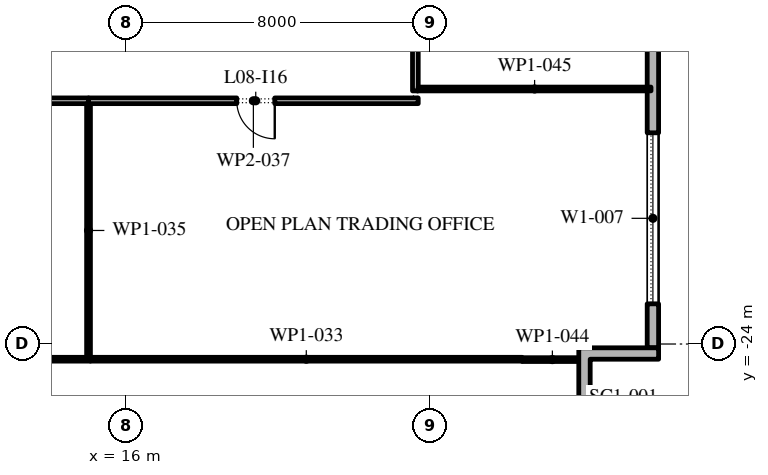
"""IFC4 building model, lengths in metres.
Left out: names, types, materials, properties, quantities, classifications, styles, units other than length and angle.
Written with IfcOpenShell. Run it as: python <this file> out.ifc"""

import sys

from ifc_helpers import new_model, si_unit, direction, frame, frame_2d, origin, place, context, subcontext, project, spatial, polyline, rectangle, outline, extrude, element, fill, save


model = new_model("IFC4")
c1 = context("Model", 3, precision=1e-05, world=origin(), true_north=direction((0.0, 1.0)))
c2 = subcontext(c1, "Body", "Model", "MODEL_VIEW")
j1 = project(units=[si_unit("LENGTHUNIT", "METRE"), si_unit("PLANEANGLEUNIT", "RADIAN")], contexts=[c1])
p1 = place(None, origin())
s1 = spatial("IfcSite", under=j1, at=p1, CompositionType="ELEMENT")
p2 = place(p1, origin())
s2 = spatial("IfcBuilding", under=s1, at=p2, CompositionType="ELEMENT")
p3 = place(p2, frame((0.0, 0.0, 43.8)))
s3 = spatial("IfcBuildingStorey", under=s2, at=p3, CompositionType="ELEMENT", Elevation=43.8)
p4 = place(p3, frame((29.85, -24.1, 0.0), z_axis=(0.0, 0.0, 1.0), x_axis=(0.0, 1.0, 0.0)))
e1 = element("IfcWall", 1, at=p4, inside=s3, PredefinedType="STANDARD", context=c2, shape_type="SweptSolid", body=[
    extrude(rectangle(XDim=49.5, YDim=0.3, at=frame_2d((24.75, 0.0))), origin(), (0.0, 0.0, 1.0), 4.0),
])
p5 = place(p4, frame((1.157, 0.0, 0.45)))
e2 = element("IfcOpeningElement", 2, at=p5, cuts=e1, PredefinedType="OPENING", context=c2, shape_type="SweptSolid", body=[
    extrude(rectangle(XDim=4.5, YDim=3.05, at=frame_2d((2.25, 1.525))), frame((0.0, 0.16, 0.0), z_axis=(0.0, -1.0, 0.0), x_axis=(1.0, 0.0, 0.0)), (0.0, 0.0, 1.0), 0.32),
])
p6 = place(p4, frame((8.121, 0.0, 0.45)))
e3 = element("IfcOpeningElement", 3, at=p6, cuts=e1, PredefinedType="OPENING", context=c2, shape_type="SweptSolid", body=[
    extrude(rectangle(XDim=4.5, YDim=2.825, at=frame_2d((2.25, 1.413))), frame((0.0, 0.16, 0.0), z_axis=(0.0, -1.0, 0.0), x_axis=(1.0, 0.0, 0.0)), (0.0, 0.0, 1.0), 0.32),
])
p7 = place(p4, frame((16.286, 0.0, 0.0)))
e4 = element("IfcOpeningElement", 4, at=p7, cuts=e1, PredefinedType="OPENING", context=c2, shape_type="SweptSolid", body=[
    extrude(rectangle(XDim=2.4, YDim=3.325, at=frame_2d((1.2, 1.663))), frame((0.0, 0.16, 0.0), z_axis=(0.0, -1.0, 0.0), x_axis=(1.0, 0.0, 0.0)), (0.0, 0.0, 1.0), 0.32),
])
p8 = place(p4, frame((22.35, 0.0, 0.45)))
e5 = element("IfcOpeningElement", 5, at=p8, cuts=e1, PredefinedType="OPENING", context=c2, shape_type="SweptSolid", body=[
    extrude(rectangle(XDim=4.5, YDim=2.875, at=frame_2d((2.25, 1.438))), frame((0.0, 0.16, 0.0), z_axis=(0.0, -1.0, 0.0), x_axis=(1.0, 0.0, 0.0)), (0.0, 0.0, 1.0), 0.32),
])
p9 = place(p4, frame((29.464, 0.0, 0.45)))
e6 = element("IfcOpeningElement", 6, at=p9, cuts=e1, PredefinedType="OPENING", context=c2, shape_type="SweptSolid", body=[
    extrude(rectangle(XDim=4.5, YDim=2.875, at=frame_2d((2.25, 1.438))), frame((0.0, 0.16, 0.0), z_axis=(0.0, -1.0, 0.0), x_axis=(1.0, 0.0, 0.0)), (0.0, 0.0, 1.0), 0.32),
])
p10 = place(p4, frame((36.579, 0.0, 0.45)))
e7 = element("IfcOpeningElement", 7, at=p10, cuts=e1, PredefinedType="OPENING", context=c2, shape_type="SweptSolid", body=[
    extrude(rectangle(XDim=4.5, YDim=3.05, at=frame_2d((2.25, 1.525))), frame((0.0, 0.16, 0.0), z_axis=(0.0, -1.0, 0.0), x_axis=(1.0, 0.0, 0.0)), (0.0, 0.0, 1.0), 0.32),
])
p11 = place(p4, frame((44.743, 0.0, 0.0)))
e8 = element("IfcOpeningElement", 8, at=p11, cuts=e1, PredefinedType="OPENING", context=c2, shape_type="SweptSolid", body=[
    extrude(rectangle(XDim=2.4, YDim=3.325, at=frame_2d((1.2, 1.663))), frame((0.0, 0.16, 0.0), z_axis=(0.0, -1.0, 0.0), x_axis=(1.0, 0.0, 0.0)), (0.0, 0.0, 1.0), 0.32),
])
p12 = place(p3, origin())
e9 = element("IfcWall", 9, at=p12, inside=s3, PredefinedType="STANDARD", context=c2, shape_type="SweptSolid", body=[
    extrude(outline(polyline([(27.9, -25.9), (27.9, -24.1), (30.0, -24.1), (30.0, -24.4), (28.2, -24.4), (28.2, -26.2), (26.4, -26.2), (26.4, -27.7), (26.1, -27.7), (26.1, -25.9), (27.9, -25.9)])), origin(), (0.0, 0.0, 1.0), 4.0),
])
p13 = place(p3, frame((1.45, -24.4, 0.0), z_axis=(0.0, 0.0, 1.0), x_axis=(1.0, 0.0, 0.0)))
e10 = element("IfcWall", 10, at=p13, inside=s3, PredefinedType="PARTITIONING", context=c2, shape_type="SweptSolid", body=[
    extrude(rectangle(XDim=13.6, YDim=0.1, at=frame_2d((6.8, 0.0))), origin(), (0.0, 0.0, 1.0), 4.0),
])
p14 = place(p3, frame((15.05, -24.4, 0.0), z_axis=(0.0, 0.0, 1.0), x_axis=(1.0, 0.0, 0.0)))
e11 = element("IfcWall", 11, at=p14, inside=s3, PredefinedType="PARTITIONING", context=c2, shape_type="SweptSolid", body=[
    extrude(rectangle(XDim=11.36, YDim=0.1, at=frame_2d((5.68, 0.0))), origin(), (0.0, 0.0, 1.0), 4.0),
])
p15 = place(p3, frame((15.0, -17.6, 0.0), z_axis=(0.0, 0.0, 1.0), x_axis=(-1.0, 0.0, 0.0)))
e12 = element("IfcWall", 12, at=p15, inside=s3, PredefinedType="PARTITIONING", context=c2, shape_type="SweptSolid", body=[
    extrude(rectangle(XDim=6.525, YDim=0.15, at=frame_2d((3.262, 0.0))), origin(), (0.0, 0.0, 1.0), 4.0),
])
p16 = place(p15, frame((2.7, 0.0, 0.0)))
e13 = element("IfcOpeningElement", 13, at=p16, cuts=e12, PredefinedType="OPENING", context=c2, shape_type="SweptSolid", body=[
    extrude(rectangle(XDim=1.0, YDim=2.1, at=frame_2d((0.5, 1.05))), frame((0.0, 0.085, 0.0), z_axis=(0.0, -1.0, 0.0), x_axis=(1.0, 0.0, 0.0)), (0.0, 0.0, 1.0), 0.17),
])
p17 = place(p3, frame((15.0, -17.675, 0.0), z_axis=(0.0, 0.0, 1.0), x_axis=(0.0, -1.0, 0.0)))
e14 = element("IfcWall", 14, at=p17, inside=s3, PredefinedType="PARTITIONING", context=c2, shape_type="SweptSolid", body=[
    extrude(rectangle(XDim=6.675, YDim=0.1, at=frame_2d((3.337, 0.0))), origin(), (0.0, 0.0, 1.0), 4.0),
])
p18 = place(p3, frame((23.675, -17.6, 0.0), z_axis=(0.0, 0.0, 1.0), x_axis=(-1.0, 0.0, 0.0)))
e15 = element("IfcWall", 15, at=p18, inside=s3, PredefinedType="PARTITIONING", context=c2, shape_type="SweptSolid", body=[
    extrude(rectangle(XDim=8.675, YDim=0.15, at=frame_2d((4.337, 0.0))), origin(), (0.0, 0.0, 1.0), 4.0),
])
p19 = place(p18, frame((3.775, 0.0, 0.0)))
e16 = element("IfcOpeningElement", 16, at=p19, cuts=e15, PredefinedType="OPENING", context=c2, shape_type="SweptSolid", body=[
    extrude(rectangle(XDim=1.0, YDim=2.1, at=frame_2d((0.5, 1.05))), frame((0.0, 0.085, 0.0), z_axis=(0.0, -1.0, 0.0), x_axis=(1.0, 0.0, 0.0)), (0.0, 0.0, 1.0), 0.17),
])
p20 = place(p3, frame((23.6, -10.22, 0.0), z_axis=(0.0, 0.0, 1.0), x_axis=(0.0, -1.0, 0.0)))
e17 = element("IfcWall", 17, at=p20, inside=s3, PredefinedType="PARTITIONING", context=c2, shape_type="SweptSolid", body=[
    extrude(rectangle(XDim=7.12, YDim=0.15, at=frame_2d((3.56, 0.0))), origin(), (0.0, 0.0, 1.0), 4.0),
])
p21 = place(p20, frame((2.42, 0.0, 0.0)))
e18 = element("IfcOpeningElement", 18, at=p21, cuts=e17, PredefinedType="OPENING", context=c2, shape_type="SweptSolid", body=[
    extrude(rectangle(XDim=1.0, YDim=2.1, at=frame_2d((0.5, 1.05))), frame((0.0, 0.085, 0.0), z_axis=(0.0, -1.0, 0.0), x_axis=(1.0, 0.0, 0.0)), (0.0, 0.0, 1.0), 0.17),
])
p22 = place(p3, frame((26.41, -24.41, 0.0), z_axis=(0.0, 0.0, 1.0), x_axis=(1.0, 0.0, 0.0)))
e19 = element("IfcWall", 19, at=p22, inside=s3, PredefinedType="PARTITIONING", context=c2, shape_type="SweptSolid", body=[
    extrude(rectangle(XDim=1.59, YDim=0.1, at=frame_2d((0.795, 0.0))), origin(), (0.0, 0.0, 1.0), 4.0),
])
p23 = place(p3, frame((29.8, -17.29, 0.0), z_axis=(0.0, 0.0, 1.0), x_axis=(-1.0, 0.0, 0.0)))
e20 = element("IfcWall", 20, at=p23, inside=s3, PredefinedType="PARTITIONING", context=c2, shape_type="SweptSolid", body=[
    extrude(rectangle(XDim=6.125, YDim=0.1, at=frame_2d((3.062, 0.0))), origin(), (0.0, 0.0, 1.0), 4.0),
])
p24 = place(p5, origin())
e21 = element("IfcWindow", 21, at=p24, inside=s3, PartitioningType="DOUBLE_PANEL_VERTICAL", PredefinedType="WINDOW", context=c2, shape_type="SweptSolid", body=[
    extrude(rectangle(XDim=4.5, YDim=3.05, at=frame_2d((2.25, 1.525))), frame((0.0, 0.03, 0.0), z_axis=(0.0, -1.0, 0.0), x_axis=(1.0, 0.0, 0.0)), (0.0, 0.0, 1.0), 0.06),
])
fill(e2, e21)
p25 = place(p19, origin())
e22 = element("IfcDoor", 22, at=p25, inside=s3, OperationType="SINGLE_SWING_RIGHT", PredefinedType="DOOR", context=c2, shape_type="SweptSolid", body=[
    extrude(rectangle(XDim=1.0, YDim=2.1, at=frame_2d((0.5, 1.05))), frame((0.0, 0.025, 0.0), z_axis=(0.0, -1.0, 0.0), x_axis=(1.0, 0.0, 0.0)), (0.0, 0.0, 1.0), 0.05),
])
fill(e16, e22)
save(model, sys.argv[1])
